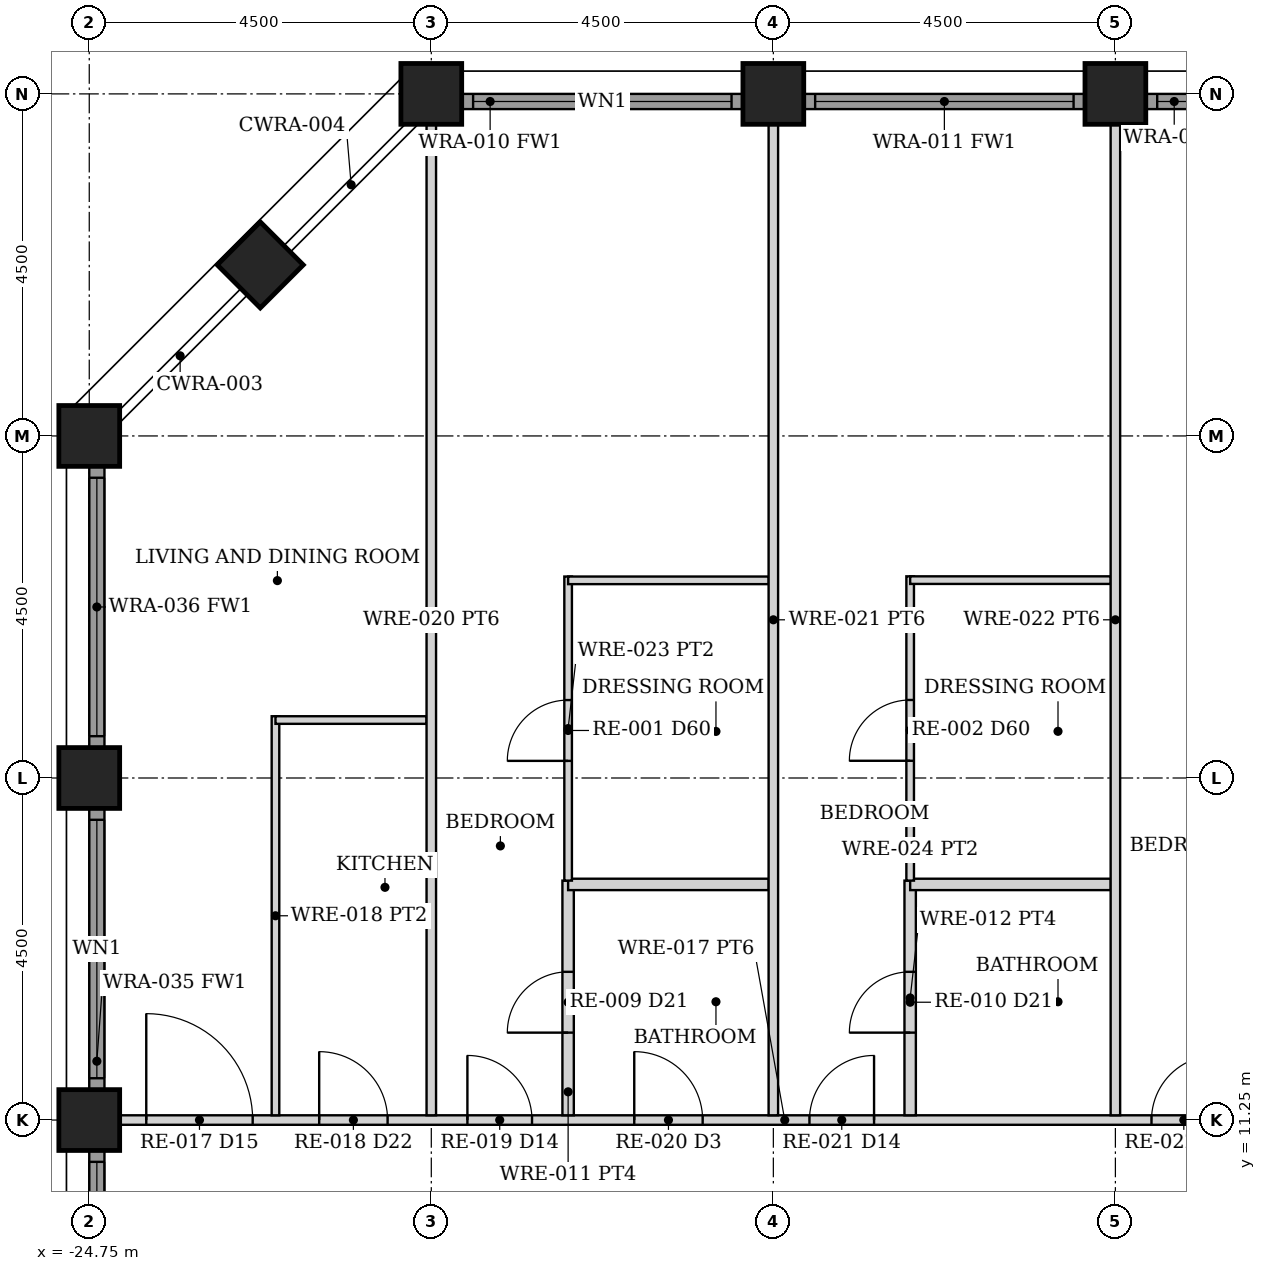
"""IFC4 building model, lengths in metres.
Left out: names, types, materials, properties, quantities, classifications, styles, units other than length and angle.
Written with IfcOpenShell. Run it as: python <this file> out.ifc"""

import sys

from ifc_helpers import new_model, si_unit, direction, frame, frame_2d, origin, origin_2d, place, context, subcontext, project, spatial, rectangle, hollow_rectangle, extrude, element, fill, save


model = new_model("IFC4")
c1 = context("Model", 3, precision=1e-05, world=origin(), true_north=direction((0.0, 1.0)))
c2 = subcontext(c1, "Body", "Model", "MODEL_VIEW")
j1 = project(units=[si_unit("LENGTHUNIT", "METRE"), si_unit("PLANEANGLEUNIT", "RADIAN")], contexts=[c1])
p1 = place(None, origin())
s1 = spatial("IfcSite", under=j1, at=p1, CompositionType="ELEMENT")
p2 = place(p1, origin())
s2 = spatial("IfcBuilding", under=s1, at=p2, CompositionType="ELEMENT")
p3 = place(p2, frame((0.0, 0.0, 68.5)))
s3 = spatial("IfcBuildingStorey", under=s2, at=p3, CompositionType="ELEMENT", Elevation=68.5)
for number, where, z_axis, x_axis in (
    (1, (-20.25, 24.75, 0.0), (0.0, 0.0, 1.0), (0.0, 1.0, 0.0)),
    (2, (-15.75, 24.75, 0.0), (0.0, 0.0, 1.0), (0.0, 1.0, 0.0)),
    (3, (-11.25, 24.75, 0.0), (0.0, 0.0, 1.0), (0.0, 1.0, 0.0)),
    (4, (-24.75, 11.25, 0.0), (0.0, 0.0, 1.0), (1.0, 0.0, 0.0)),
    (5, (-24.75, 15.75, 0.0), (0.0, 0.0, 1.0), (1.0, 0.0, 0.0)),
    (6, (-24.75, 20.25, 0.0), (0.0, 0.0, 1.0), (1.0, 0.0, 0.0)),
    (7, (-22.5, 22.5, 0.0), (0.0, 0.0, 1.0), (0.707, -0.707, 0.0)),
):
    element("IfcColumn", number, at=place(p3, frame(where, z_axis=z_axis, x_axis=x_axis)), inside=s3, PredefinedType="COLUMN", context=c2, shape_type="SweptSolid", body=[
        extrude(hollow_rectangle(XDim=0.8, YDim=0.8, WallThickness=0.06, at=origin_2d()), origin(), (0.0, 0.0, 1.0), 3.5),
    ])
p4 = place(p3, frame((-19.845, 24.65, 0.0), z_axis=(0.0, 0.0, 1.0), x_axis=(1.0, 0.0, 0.0)))
e8 = element("IfcWall", 8, at=p4, inside=s3, PredefinedType="SOLIDWALL", context=c2, shape_type="SweptSolid", body=[
    extrude(rectangle(XDim=3.69, YDim=0.2, at=frame_2d((1.845, 0.0))), origin(), (0.0, 0.0, 1.0), 2.379),
])
p5 = place(p4, frame((0.145, 0.0, 0.3)))
e9 = element("IfcOpeningElement", 9, at=p5, cuts=e8, PredefinedType="OPENING", context=c2, shape_type="SweptSolid", body=[
    extrude(rectangle(XDim=3.4, YDim=1.929, at=frame_2d((1.7, 0.964))), frame((0.0, 0.11, 0.0), z_axis=(0.0, -1.0, 0.0), x_axis=(1.0, 0.0, 0.0)), (0.0, 0.0, 1.0), 0.22),
])
p6 = place(p3, frame((-15.345, 24.65, 0.0), z_axis=(0.0, 0.0, 1.0), x_axis=(1.0, 0.0, 0.0)))
e10 = element("IfcWall", 10, at=p6, inside=s3, PredefinedType="SOLIDWALL", context=c2, shape_type="SweptSolid", body=[
    extrude(rectangle(XDim=3.69, YDim=0.2, at=frame_2d((1.845, 0.0))), origin(), (0.0, 0.0, 1.0), 2.379),
])
p7 = place(p6, frame((0.145, 0.0, 0.3)))
e11 = element("IfcOpeningElement", 11, at=p7, cuts=e10, PredefinedType="OPENING", context=c2, shape_type="SweptSolid", body=[
    extrude(rectangle(XDim=3.4, YDim=1.929, at=frame_2d((1.7, 0.964))), frame((0.0, 0.11, 0.0), z_axis=(0.0, -1.0, 0.0), x_axis=(1.0, 0.0, 0.0)), (0.0, 0.0, 1.0), 0.22),
])
p8 = place(p3, frame((-10.845, 24.65, 0.0), z_axis=(0.0, 0.0, 1.0), x_axis=(1.0, 0.0, 0.0)))
e12 = element("IfcWall", 12, at=p8, inside=s3, PredefinedType="SOLIDWALL", context=c2, shape_type="SweptSolid", body=[
    extrude(rectangle(XDim=3.69, YDim=0.2, at=frame_2d((1.845, 0.0))), origin(), (0.0, 0.0, 1.0), 2.379),
])
p9 = place(p8, frame((0.145, 0.0, 0.3)))
e13 = element("IfcOpeningElement", 13, at=p9, cuts=e12, PredefinedType="OPENING", context=c2, shape_type="SweptSolid", body=[
    extrude(rectangle(XDim=3.4, YDim=1.929, at=frame_2d((1.7, 0.964))), frame((0.0, 0.11, 0.0), z_axis=(0.0, -1.0, 0.0), x_axis=(1.0, 0.0, 0.0)), (0.0, 0.0, 1.0), 0.22),
])
p10 = place(p3, frame((-24.65, 7.155, 0.0), z_axis=(0.0, 0.0, 1.0), x_axis=(0.0, 1.0, 0.0)))
e14 = element("IfcWall", 14, at=p10, inside=s3, PredefinedType="SOLIDWALL", context=c2, shape_type="SweptSolid", body=[
    extrude(rectangle(XDim=3.69, YDim=0.2, at=frame_2d((1.845, 0.0))), origin(), (0.0, 0.0, 1.0), 2.379),
])
p11 = place(p10, frame((0.145, 0.0, 0.3)))
e15 = element("IfcOpeningElement", 15, at=p11, cuts=e14, PredefinedType="OPENING", context=c2, shape_type="SweptSolid", body=[
    extrude(rectangle(XDim=3.4, YDim=1.929, at=frame_2d((1.7, 0.964))), frame((0.0, 0.11, 0.0), z_axis=(0.0, -1.0, 0.0), x_axis=(1.0, 0.0, 0.0)), (0.0, 0.0, 1.0), 0.22),
])
p12 = place(p3, frame((-24.65, 11.655, 0.0), z_axis=(0.0, 0.0, 1.0), x_axis=(0.0, 1.0, 0.0)))
e16 = element("IfcWall", 16, at=p12, inside=s3, PredefinedType="SOLIDWALL", context=c2, shape_type="SweptSolid", body=[
    extrude(rectangle(XDim=3.69, YDim=0.2, at=frame_2d((1.845, 0.0))), origin(), (0.0, 0.0, 1.0), 2.379),
])
p13 = place(p12, frame((0.145, 0.0, 0.3)))
e17 = element("IfcOpeningElement", 17, at=p13, cuts=e16, PredefinedType="OPENING", context=c2, shape_type="SweptSolid", body=[
    extrude(rectangle(XDim=3.4, YDim=1.929, at=frame_2d((1.7, 0.964))), frame((0.0, 0.11, 0.0), z_axis=(0.0, -1.0, 0.0), x_axis=(1.0, 0.0, 0.0)), (0.0, 0.0, 1.0), 0.22),
])
p14 = place(p3, frame((-24.65, 16.155, 0.0), z_axis=(0.0, 0.0, 1.0), x_axis=(0.0, 1.0, 0.0)))
e18 = element("IfcWall", 18, at=p14, inside=s3, PredefinedType="SOLIDWALL", context=c2, shape_type="SweptSolid", body=[
    extrude(rectangle(XDim=3.69, YDim=0.2, at=frame_2d((1.845, 0.0))), origin(), (0.0, 0.0, 1.0), 2.379),
])
p15 = place(p14, frame((0.145, 0.0, 0.3)))
e19 = element("IfcOpeningElement", 19, at=p15, cuts=e18, PredefinedType="OPENING", context=c2, shape_type="SweptSolid", body=[
    extrude(rectangle(XDim=3.4, YDim=1.929, at=frame_2d((1.7, 0.964))), frame((0.0, 0.11, 0.0), z_axis=(0.0, -1.0, 0.0), x_axis=(1.0, 0.0, 0.0)), (0.0, 0.0, 1.0), 0.22),
])
p16 = place(p3, frame((-24.35, 11.25, 0.0), z_axis=(0.0, 0.0, 1.0), x_axis=(1.0, 0.0, 0.0)))
e20 = element("IfcWall", 20, at=p16, inside=s3, PredefinedType="PARTITIONING", context=c2, shape_type="SweptSolid", body=[
    extrude(rectangle(XDim=17.5, YDim=0.125, at=frame_2d((8.75, 0.0))), origin(), (0.0, 0.0, 1.0), 2.373),
])
p17 = place(p16, frame((2.625, 0.0, 0.0)))
e21 = element("IfcOpeningElement", 21, at=p17, cuts=e20, PredefinedType="OPENING", context=c2, shape_type="SweptSolid", body=[
    extrude(rectangle(XDim=0.9, YDim=2.1, at=frame_2d((0.45, 1.05))), frame((0.0, 0.073, 0.0), z_axis=(0.0, -1.0, 0.0), x_axis=(1.0, 0.0, 0.0)), (0.0, 0.0, 1.0), 0.145),
])
p18 = place(p16, frame((0.35, 0.0, 0.0)))
e22 = element("IfcOpeningElement", 22, at=p18, cuts=e20, PredefinedType="OPENING", context=c2, shape_type="SweptSolid", body=[
    extrude(rectangle(XDim=1.4, YDim=2.1, at=frame_2d((0.7, 1.05))), frame((0.0, 0.073, 0.0), z_axis=(0.0, -1.0, 0.0), x_axis=(1.0, 0.0, 0.0)), (0.0, 0.0, 1.0), 0.145),
])
p19 = place(p16, frame((4.575, 0.0, 0.0)))
e23 = element("IfcOpeningElement", 23, at=p19, cuts=e20, PredefinedType="OPENING", context=c2, shape_type="SweptSolid", body=[
    extrude(rectangle(XDim=0.85, YDim=2.1, at=frame_2d((0.425, 1.05))), frame((0.0, 0.073, 0.0), z_axis=(0.0, -1.0, 0.0), x_axis=(1.0, 0.0, 0.0)), (0.0, 0.0, 1.0), 0.145),
])
p20 = place(p16, frame((6.77, 0.0, 0.0)))
e24 = element("IfcOpeningElement", 24, at=p20, cuts=e20, PredefinedType="OPENING", context=c2, shape_type="SweptSolid", body=[
    extrude(rectangle(XDim=0.9, YDim=2.1, at=frame_2d((0.45, 1.05))), frame((0.0, 0.073, 0.0), z_axis=(0.0, -1.0, 0.0), x_axis=(1.0, 0.0, 0.0)), (0.0, 0.0, 1.0), 0.145),
])
p21 = place(p16, frame((9.075, 0.0, 0.0)))
e25 = element("IfcOpeningElement", 25, at=p21, cuts=e20, PredefinedType="OPENING", context=c2, shape_type="SweptSolid", body=[
    extrude(rectangle(XDim=0.85, YDim=2.1, at=frame_2d((0.425, 1.05))), frame((0.0, 0.073, 0.0), z_axis=(0.0, -1.0, 0.0), x_axis=(1.0, 0.0, 0.0)), (0.0, 0.0, 1.0), 0.145),
])
p22 = place(p16, frame((13.575, 0.0, 0.0)))
e26 = element("IfcOpeningElement", 26, at=p22, cuts=e20, PredefinedType="OPENING", context=c2, shape_type="SweptSolid", body=[
    extrude(rectangle(XDim=0.85, YDim=2.1, at=frame_2d((0.425, 1.05))), frame((0.0, 0.073, 0.0), z_axis=(0.0, -1.0, 0.0), x_axis=(1.0, 0.0, 0.0)), (0.0, 0.0, 1.0), 0.145),
])
p23 = place(p3, frame((-22.3, 11.312, 0.0), z_axis=(0.0, 0.0, 1.0), x_axis=(0.0, 1.0, 0.0)))
e27 = element("IfcWall", 27, at=p23, inside=s3, PredefinedType="PARTITIONING", context=c2, shape_type="SweptSolid", body=[
    extrude(rectangle(XDim=5.25, YDim=0.1, at=frame_2d((2.625, 0.0))), origin(), (0.0, 0.0, 1.0), 2.373),
])
p24 = place(p3, frame((-22.3, 16.512, 0.0), z_axis=(0.0, 0.0, 1.0), x_axis=(1.0, 0.0, 0.0)))
e28 = element("IfcWall", 28, at=p24, inside=s3, PredefinedType="PARTITIONING", context=c2, shape_type="SweptSolid", body=[
    extrude(rectangle(XDim=1.988, YDim=0.1, at=frame_2d((0.994, 0.0))), origin(), (0.0, 0.0, 1.0), 2.373),
])
p25 = place(p3, frame((-20.25, 11.312, 0.0), z_axis=(0.0, 0.0, 1.0), x_axis=(0.0, 1.0, 0.0)))
e29 = element("IfcWall", 29, at=p25, inside=s3, PredefinedType="PARTITIONING", context=c2, shape_type="SweptSolid", body=[
    extrude(rectangle(XDim=13.038, YDim=0.125, at=frame_2d((6.519, 0.0))), origin(), (0.0, 0.0, 1.0), 2.373),
])
p26 = place(p3, frame((-18.45, 11.312, 0.0), z_axis=(0.0, 0.0, 1.0), x_axis=(0.0, 1.0, 0.0)))
e30 = element("IfcWall", 30, at=p26, inside=s3, PredefinedType="PARTITIONING", context=c2, shape_type="SweptSolid", body=[
    extrude(rectangle(XDim=3.087, YDim=0.15, at=frame_2d((1.544, 0.0))), origin(), (0.0, 0.0, 1.0), 2.373),
])
p27 = place(p26, frame((1.087, 0.0, 0.0)))
e31 = element("IfcOpeningElement", 31, at=p27, cuts=e30, PredefinedType="OPENING", context=c2, shape_type="SweptSolid", body=[
    extrude(rectangle(XDim=0.8, YDim=2.1, at=frame_2d((0.4, 1.05))), frame((0.0, 0.085, 0.0), z_axis=(0.0, -1.0, 0.0), x_axis=(1.0, 0.0, 0.0)), (0.0, 0.0, 1.0), 0.17),
])
p28 = place(p3, frame((-18.45, 14.35, 0.0), z_axis=(0.0, 0.0, 1.0), x_axis=(1.0, 0.0, 0.0)))
e32 = element("IfcWall", 32, at=p28, inside=s3, PredefinedType="PARTITIONING", context=c2, shape_type="SweptSolid", body=[
    extrude(rectangle(XDim=2.64, YDim=0.15, at=frame_2d((1.32, 0.0))), origin(), (0.0, 0.0, 1.0), 2.373),
])
p29 = place(p3, frame((-18.45, 14.4, 0.0), z_axis=(0.0, 0.0, 1.0), x_axis=(0.0, 1.0, 0.0)))
e33 = element("IfcWall", 33, at=p29, inside=s3, PredefinedType="PARTITIONING", context=c2, shape_type="SweptSolid", body=[
    extrude(rectangle(XDim=4.0, YDim=0.1, at=frame_2d((2.0, 0.0))), origin(), (0.0, 0.0, 1.0), 2.373),
])
p30 = place(p29, frame((1.575, 0.0, 0.0)))
e34 = element("IfcOpeningElement", 34, at=p30, cuts=e33, PredefinedType="OPENING", context=c2, shape_type="SweptSolid", body=[
    extrude(rectangle(XDim=0.8, YDim=2.1, at=frame_2d((0.4, 1.05))), frame((0.0, 0.06, 0.0), z_axis=(0.0, -1.0, 0.0), x_axis=(1.0, 0.0, 0.0)), (0.0, 0.0, 1.0), 0.12),
])
p31 = place(p3, frame((-18.45, 18.35, 0.0), z_axis=(0.0, 0.0, 1.0), x_axis=(1.0, 0.0, 0.0)))
e35 = element("IfcWall", 35, at=p31, inside=s3, PredefinedType="PARTITIONING", context=c2, shape_type="SweptSolid", body=[
    extrude(rectangle(XDim=2.64, YDim=0.1, at=frame_2d((1.32, 0.0))), origin(), (0.0, 0.0, 1.0), 2.373),
])
p32 = place(p3, frame((-15.75, 11.312, 0.0), z_axis=(0.0, 0.0, 1.0), x_axis=(0.0, 1.0, 0.0)))
e36 = element("IfcWall", 36, at=p32, inside=s3, PredefinedType="PARTITIONING", context=c2, shape_type="SweptSolid", body=[
    extrude(rectangle(XDim=13.038, YDim=0.125, at=frame_2d((6.519, 0.0))), origin(), (0.0, 0.0, 1.0), 2.373),
])
p33 = place(p3, frame((-13.95, 11.312, 0.0), z_axis=(0.0, 0.0, 1.0), x_axis=(0.0, 1.0, 0.0)))
e37 = element("IfcWall", 37, at=p33, inside=s3, PredefinedType="PARTITIONING", context=c2, shape_type="SweptSolid", body=[
    extrude(rectangle(XDim=3.087, YDim=0.15, at=frame_2d((1.544, 0.0))), origin(), (0.0, 0.0, 1.0), 2.373),
])
p34 = place(p33, frame((1.087, 0.0, 0.0)))
e38 = element("IfcOpeningElement", 38, at=p34, cuts=e37, PredefinedType="OPENING", context=c2, shape_type="SweptSolid", body=[
    extrude(rectangle(XDim=0.8, YDim=2.1, at=frame_2d((0.4, 1.05))), frame((0.0, 0.085, 0.0), z_axis=(0.0, -1.0, 0.0), x_axis=(1.0, 0.0, 0.0)), (0.0, 0.0, 1.0), 0.17),
])
p35 = place(p3, frame((-13.95, 14.35, 0.0), z_axis=(0.0, 0.0, 1.0), x_axis=(1.0, 0.0, 0.0)))
e39 = element("IfcWall", 39, at=p35, inside=s3, PredefinedType="PARTITIONING", context=c2, shape_type="SweptSolid", body=[
    extrude(rectangle(XDim=2.64, YDim=0.15, at=frame_2d((1.32, 0.0))), origin(), (0.0, 0.0, 1.0), 2.373),
])
p36 = place(p3, frame((-13.95, 14.4, 0.0), z_axis=(0.0, 0.0, 1.0), x_axis=(0.0, 1.0, 0.0)))
e40 = element("IfcWall", 40, at=p36, inside=s3, PredefinedType="PARTITIONING", context=c2, shape_type="SweptSolid", body=[
    extrude(rectangle(XDim=4.003, YDim=0.1, at=frame_2d((2.001, 0.0))), origin(), (0.0, 0.0, 1.0), 2.373),
])
p37 = place(p36, frame((1.576, 0.0, 0.0)))
e41 = element("IfcOpeningElement", 41, at=p37, cuts=e40, PredefinedType="OPENING", context=c2, shape_type="SweptSolid", body=[
    extrude(rectangle(XDim=0.8, YDim=2.1, at=frame_2d((0.4, 1.05))), frame((0.0, 0.06, 0.0), z_axis=(0.0, -1.0, 0.0), x_axis=(1.0, 0.0, 0.0)), (0.0, 0.0, 1.0), 0.12),
])
p38 = place(p3, frame((-13.95, 18.353, 0.0), z_axis=(0.0, 0.0, 1.0), x_axis=(1.0, 0.0, 0.0)))
e42 = element("IfcWall", 42, at=p38, inside=s3, PredefinedType="PARTITIONING", context=c2, shape_type="SweptSolid", body=[
    extrude(rectangle(XDim=2.64, YDim=0.1, at=frame_2d((1.32, 0.0))), origin(), (0.0, 0.0, 1.0), 2.373),
])
p39 = place(p3, frame((-11.25, 11.312, 0.0), z_axis=(0.0, 0.0, 1.0), x_axis=(0.0, 1.0, 0.0)))
e43 = element("IfcWall", 43, at=p39, inside=s3, PredefinedType="PARTITIONING", context=c2, shape_type="SweptSolid", body=[
    extrude(rectangle(XDim=13.038, YDim=0.125, at=frame_2d((6.519, 0.0))), origin(), (0.0, 0.0, 1.0), 2.373),
])
p40 = place(p5, origin())
e44 = element("IfcWindow", 44, at=p40, inside=s3, PartitioningType="SINGLE_PANEL", PredefinedType="WINDOW", context=c2, shape_type="SweptSolid", body=[
    extrude(rectangle(XDim=3.4, YDim=1.929, at=frame_2d((1.7, 0.964))), frame((0.0, 0.03, 0.0), z_axis=(0.0, -1.0, 0.0), x_axis=(1.0, 0.0, 0.0)), (0.0, 0.0, 1.0), 0.06),
])
fill(e9, e44)
p41 = place(p7, origin())
e45 = element("IfcWindow", 45, at=p41, inside=s3, PartitioningType="SINGLE_PANEL", PredefinedType="WINDOW", context=c2, shape_type="SweptSolid", body=[
    extrude(rectangle(XDim=3.4, YDim=1.929, at=frame_2d((1.7, 0.964))), frame((0.0, 0.03, 0.0), z_axis=(0.0, -1.0, 0.0), x_axis=(1.0, 0.0, 0.0)), (0.0, 0.0, 1.0), 0.06),
])
fill(e11, e45)
p42 = place(p9, origin())
e46 = element("IfcWindow", 46, at=p42, inside=s3, PartitioningType="SINGLE_PANEL", PredefinedType="WINDOW", context=c2, shape_type="SweptSolid", body=[
    extrude(rectangle(XDim=3.4, YDim=1.929, at=frame_2d((1.7, 0.964))), frame((0.0, 0.03, 0.0), z_axis=(0.0, -1.0, 0.0), x_axis=(1.0, 0.0, 0.0)), (0.0, 0.0, 1.0), 0.06),
])
fill(e13, e46)
p43 = place(p11, origin())
e47 = element("IfcWindow", 47, at=p43, inside=s3, PartitioningType="SINGLE_PANEL", PredefinedType="WINDOW", context=c2, shape_type="SweptSolid", body=[
    extrude(rectangle(XDim=3.4, YDim=1.929, at=frame_2d((1.7, 0.964))), frame((0.0, 0.03, 0.0), z_axis=(0.0, -1.0, 0.0), x_axis=(1.0, 0.0, 0.0)), (0.0, 0.0, 1.0), 0.06),
])
fill(e15, e47)
p44 = place(p13, origin())
e48 = element("IfcWindow", 48, at=p44, inside=s3, PartitioningType="SINGLE_PANEL", PredefinedType="WINDOW", context=c2, shape_type="SweptSolid", body=[
    extrude(rectangle(XDim=3.4, YDim=1.929, at=frame_2d((1.7, 0.964))), frame((0.0, 0.03, 0.0), z_axis=(0.0, -1.0, 0.0), x_axis=(1.0, 0.0, 0.0)), (0.0, 0.0, 1.0), 0.06),
])
fill(e17, e48)
p45 = place(p15, origin())
e49 = element("IfcWindow", 49, at=p45, inside=s3, PartitioningType="SINGLE_PANEL", PredefinedType="WINDOW", context=c2, shape_type="SweptSolid", body=[
    extrude(rectangle(XDim=3.4, YDim=1.929, at=frame_2d((1.7, 0.964))), frame((0.0, 0.03, 0.0), z_axis=(0.0, -1.0, 0.0), x_axis=(1.0, 0.0, 0.0)), (0.0, 0.0, 1.0), 0.06),
])
fill(e19, e49)
p46 = place(p17, origin())
e50 = element("IfcDoor", 50, at=p46, inside=s3, OperationType="SINGLE_SWING_LEFT", PredefinedType="DOOR", context=c2, shape_type="SweptSolid", body=[
    extrude(rectangle(XDim=0.9, YDim=2.1, at=frame_2d((0.45, 1.05))), frame((0.0, 0.025, 0.0), z_axis=(0.0, -1.0, 0.0), x_axis=(1.0, 0.0, 0.0)), (0.0, 0.0, 1.0), 0.05),
])
fill(e21, e50)
p47 = place(p18, origin())
e51 = element("IfcDoor", 51, at=p47, inside=s3, OperationType="SINGLE_SWING_LEFT", PredefinedType="DOOR", context=c2, shape_type="SweptSolid", body=[
    extrude(rectangle(XDim=1.4, YDim=2.1, at=frame_2d((0.7, 1.05))), frame((0.0, 0.025, 0.0), z_axis=(0.0, -1.0, 0.0), x_axis=(1.0, 0.0, 0.0)), (0.0, 0.0, 1.0), 0.05),
])
fill(e22, e51)
p48 = place(p19, origin())
e52 = element("IfcDoor", 52, at=p48, inside=s3, OperationType="SINGLE_SWING_LEFT", PredefinedType="DOOR", context=c2, shape_type="SweptSolid", body=[
    extrude(rectangle(XDim=0.85, YDim=2.1, at=frame_2d((0.425, 1.05))), frame((0.0, 0.025, 0.0), z_axis=(0.0, -1.0, 0.0), x_axis=(1.0, 0.0, 0.0)), (0.0, 0.0, 1.0), 0.05),
])
fill(e23, e52)
p49 = place(p27, origin())
e53 = element("IfcDoor", 53, at=p49, inside=s3, OperationType="SINGLE_SWING_LEFT", PredefinedType="DOOR", context=c2, shape_type="SweptSolid", body=[
    extrude(rectangle(XDim=0.8, YDim=2.1, at=frame_2d((0.4, 1.05))), frame((0.0, 0.025, 0.0), z_axis=(0.0, -1.0, 0.0), x_axis=(1.0, 0.0, 0.0)), (0.0, 0.0, 1.0), 0.05),
])
fill(e31, e53)
p50 = place(p20, origin())
e54 = element("IfcDoor", 54, at=p50, inside=s3, OperationType="SINGLE_SWING_LEFT", PredefinedType="DOOR", context=c2, shape_type="SweptSolid", body=[
    extrude(rectangle(XDim=0.9, YDim=2.1, at=frame_2d((0.45, 1.05))), frame((0.0, 0.025, 0.0), z_axis=(0.0, -1.0, 0.0), x_axis=(1.0, 0.0, 0.0)), (0.0, 0.0, 1.0), 0.05),
])
fill(e24, e54)
p51 = place(p30, origin())
e55 = element("IfcDoor", 55, at=p51, inside=s3, OperationType="SINGLE_SWING_LEFT", PredefinedType="DOOR", context=c2, shape_type="SweptSolid", body=[
    extrude(rectangle(XDim=0.8, YDim=2.1, at=frame_2d((0.4, 1.05))), frame((0.0, 0.025, 0.0), z_axis=(0.0, -1.0, 0.0), x_axis=(1.0, 0.0, 0.0)), (0.0, 0.0, 1.0), 0.05),
])
fill(e34, e55)
p52 = place(p21, origin())
e56 = element("IfcDoor", 56, at=p52, inside=s3, OperationType="SINGLE_SWING_RIGHT", PredefinedType="DOOR", context=c2, shape_type="SweptSolid", body=[
    extrude(rectangle(XDim=0.85, YDim=2.1, at=frame_2d((0.425, 1.05))), frame((0.0, 0.025, 0.0), z_axis=(0.0, -1.0, 0.0), x_axis=(1.0, 0.0, 0.0)), (0.0, 0.0, 1.0), 0.05),
])
fill(e25, e56)
p53 = place(p34, origin())
e57 = element("IfcDoor", 57, at=p53, inside=s3, OperationType="SINGLE_SWING_LEFT", PredefinedType="DOOR", context=c2, shape_type="SweptSolid", body=[
    extrude(rectangle(XDim=0.8, YDim=2.1, at=frame_2d((0.4, 1.05))), frame((0.0, 0.025, 0.0), z_axis=(0.0, -1.0, 0.0), x_axis=(1.0, 0.0, 0.0)), (0.0, 0.0, 1.0), 0.05),
])
fill(e38, e57)
p54 = place(p37, origin())
e58 = element("IfcDoor", 58, at=p54, inside=s3, OperationType="SINGLE_SWING_LEFT", PredefinedType="DOOR", context=c2, shape_type="SweptSolid", body=[
    extrude(rectangle(XDim=0.8, YDim=2.1, at=frame_2d((0.4, 1.05))), frame((0.0, 0.025, 0.0), z_axis=(0.0, -1.0, 0.0), x_axis=(1.0, 0.0, 0.0)), (0.0, 0.0, 1.0), 0.05),
])
fill(e41, e58)
p55 = place(p22, origin())
e59 = element("IfcDoor", 59, at=p55, inside=s3, OperationType="SINGLE_SWING_RIGHT", PredefinedType="DOOR", context=c2, shape_type="SweptSolid", body=[
    extrude(rectangle(XDim=0.85, YDim=2.1, at=frame_2d((0.425, 1.05))), frame((0.0, 0.025, 0.0), z_axis=(0.0, -1.0, 0.0), x_axis=(1.0, 0.0, 0.0)), (0.0, 0.0, 1.0), 0.05),
])
fill(e26, e59)
save(model, sys.argv[1])
